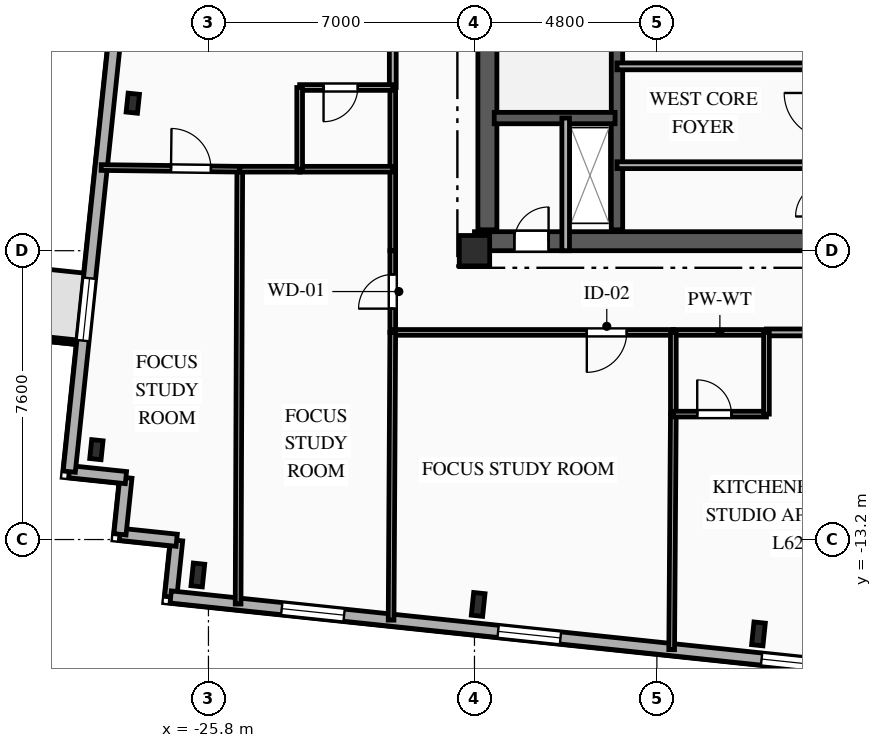
"""IFC4 building model, lengths in metres.
Left out: names, types, materials, properties, quantities, classifications, styles, units other than length and angle.
Written with IfcOpenShell. Run it as: python <this file> out.ifc"""

import sys

from ifc_helpers import new_model, si_unit, direction, frame, frame_2d, origin, origin_2d, place, context, subcontext, project, spatial, rectangle, i_section, extrude, element, fill, save


model = new_model("IFC4")
c1 = context("Model", 3, precision=1e-05, world=origin(), true_north=direction((0.0, 1.0)))
c2 = subcontext(c1, "Body", "Model", "MODEL_VIEW")
j1 = project(units=[si_unit("LENGTHUNIT", "METRE"), si_unit("PLANEANGLEUNIT", "RADIAN")], contexts=[c1])
p1 = place(None, origin())
s1 = spatial("IfcSite", under=j1, at=p1, CompositionType="ELEMENT")
p2 = place(p1, origin())
s2 = spatial("IfcBuilding", under=s1, at=p2, CompositionType="ELEMENT")
p3 = place(p2, frame((0.0, 0.0, 219.85)))
s3 = spatial("IfcBuildingStorey", under=s2, at=p3, CompositionType="ELEMENT", Elevation=219.85)
p4 = place(p3, frame((-18.8, -5.6, 0.0), z_axis=(0.0, 0.0, 1.0), x_axis=(1.0, 0.0, 0.0)))
e1 = element("IfcColumn", 1, at=p4, inside=s3, PredefinedType="COLUMN", context=c2, shape_type="SweptSolid", body=[
    extrude(rectangle(XDim=0.8, YDim=0.8, at=origin_2d()), origin(), (0.0, 0.0, 1.0), 3.35),
])
for number, where, z_axis, x_axis in (
    (2, (-26.079, -14.133, 0.0), (0.0, 0.0, 1.0), (0.995, -0.105, 0.0)),
    (3, (-18.703, -14.908, 0.0), (0.0, 0.0, 1.0), (0.995, -0.105, 0.0)),
    (4, (-11.327, -15.683, 0.0), (0.0, 0.0, 1.0), (0.995, -0.105, 0.0)),
):
    element("IfcColumn", number, at=place(p3, frame(where, z_axis=z_axis, x_axis=x_axis)), inside=s3, PredefinedType="COLUMN", context=c2, shape_type="SweptSolid", body=[
        extrude(i_section(OverallWidth=0.3, OverallDepth=0.6, WebThickness=0.015, FlangeThickness=0.03, FilletRadius=0.027, at=origin_2d()), origin(), (0.0, 0.0, 1.0), 3.35),
    ])
for number, where, z_axis, x_axis in (
    (5, (-27.791, -1.719, 0.0), (0.0, 0.0, 1.0), (0.995, -0.105, 0.0)),
    (6, (-28.749, -10.835, 0.0), (0.0, 0.0, 1.0), (0.995, -0.105, 0.0)),
):
    element("IfcColumn", number, at=place(p3, frame(where, z_axis=z_axis, x_axis=x_axis)), inside=s3, PredefinedType="COLUMN", context=c2, shape_type="SweptSolid", body=[
        extrude(i_section(OverallWidth=0.3, OverallDepth=0.5, WebThickness=0.014, FlangeThickness=0.028, FilletRadius=0.027, at=origin_2d()), origin(), (0.0, 0.0, 1.0), 3.35),
    ])
for number, where, z_axis, x_axis in (
    (7, (-26.793, -14.711, 0.0), (0.0, 0.0, 1.0), (0.104, 0.995, 0.0)),
    (8, (-26.637, -13.219, 0.0), (0.0, 0.0, 1.0), (-0.995, 0.104, 0.0)),
):
    element("IfcWall", number, at=place(p3, frame(where, z_axis=z_axis, x_axis=x_axis)), inside=s3, PredefinedType="SOLIDWALL", context=c2, shape_type="SweptSolid", body=[
        extrude(rectangle(XDim=1.5, YDim=0.32, at=frame_2d((0.75, 0.0))), origin(), (0.0, 0.0, 1.0), 3.0),
    ])
p5 = place(p3, frame((-28.128, -13.062, 0.0), z_axis=(0.0, 0.0, 1.0), x_axis=(0.104481464157, 0.994526834051, 0.0)))
e9 = element("IfcWall", 9, at=p5, inside=s3, PredefinedType="SOLIDWALL", context=c2, shape_type="SweptSolid", body=[
    extrude(rectangle(XDim=1.5, YDim=0.32, at=frame_2d((0.75, 0.0))), origin(), (0.0, 0.0, 1.0), 3.0),
])
p6 = place(p3, frame((-27.972, -11.571, 0.0), z_axis=(0.0, 0.0, 1.0), x_axis=(-0.994525057048, 0.104498377516, 0.0)))
e10 = element("IfcWall", 10, at=p6, inside=s3, PredefinedType="SOLIDWALL", context=c2, shape_type="SweptSolid", body=[
    extrude(rectangle(XDim=1.5, YDim=0.32, at=frame_2d((0.75, 0.0))), origin(), (0.0, 0.0, 1.0), 3.0),
])
p7 = place(p3, frame((-29.463, -11.414, 0.0), z_axis=(0.0, 0.0, 1.0), x_axis=(0.104530779244, 0.994521651947, 0.0)))
e11 = element("IfcWall", 11, at=p7, inside=s3, PredefinedType="SOLIDWALL", context=c2, shape_type="SweptSolid", body=[
    extrude(rectangle(XDim=28.8, YDim=0.32, at=frame_2d((14.4, 0.0))), origin(), (0.0, 0.0, 1.0), 3.0),
])
p8 = place(p7, frame((3.467, 0.0, 0.85)))
e12 = element("IfcOpeningElement", 12, at=p8, cuts=e11, PredefinedType="OPENING", context=c2, shape_type="SweptSolid", body=[
    extrude(rectangle(XDim=1.65, YDim=1.85, at=frame_2d((0.825, 0.925))), frame((0.0, 0.17, 0.0), z_axis=(0.0, -1.0, 0.0), x_axis=(1.0, 0.0, 0.0)), (0.0, 0.0, 1.0), 0.34),
])
p9 = place(p7, frame((12.738, 0.0, 0.85)))
e13 = element("IfcOpeningElement", 13, at=p9, cuts=e11, PredefinedType="OPENING", context=c2, shape_type="SweptSolid", body=[
    extrude(rectangle(XDim=2.2, YDim=1.85, at=frame_2d((1.1, 0.925))), frame((0.0, 0.17, 0.0), z_axis=(0.0, -1.0, 0.0), x_axis=(1.0, 0.0, 0.0)), (0.0, 0.0, 1.0), 0.34),
])
p10 = place(p7, frame((23.162, 0.0, 0.85)))
e14 = element("IfcOpeningElement", 14, at=p10, cuts=e11, PredefinedType="OPENING", context=c2, shape_type="SweptSolid", body=[
    extrude(rectangle(XDim=1.65, YDim=1.85, at=frame_2d((0.825, 0.925))), frame((0.0, 0.17, 0.0), z_axis=(0.0, -1.0, 0.0), x_axis=(1.0, 0.0, 0.0)), (0.0, 0.0, 1.0), 0.34),
])
p11 = place(p3, frame((18.756, -19.498, 0.0), z_axis=(0.0, 0.0, 1.0), x_axis=(-0.994522060044, 0.104526896475, 0.0)))
e15 = element("IfcWall", 15, at=p11, inside=s3, PredefinedType="SOLIDWALL", context=c2, shape_type="SweptSolid", body=[
    extrude(rectangle(XDim=45.8, YDim=0.32, at=frame_2d((22.9, 0.0))), origin(), (0.0, 0.0, 1.0), 3.0),
])
p12 = place(p11, frame((1.657, 0.0, 0.85)))
e16 = element("IfcOpeningElement", 16, at=p12, cuts=e15, PredefinedType="OPENING", context=c2, shape_type="SweptSolid", body=[
    extrude(rectangle(XDim=1.65, YDim=1.85, at=frame_2d((0.825, 0.925))), frame((0.0, 0.17, 0.0), z_axis=(0.0, -1.0, 0.0), x_axis=(1.0, 0.0, 0.0)), (0.0, 0.0, 1.0), 0.34),
])
p13 = place(p11, frame((6.907, 0.0, 0.85)))
e17 = element("IfcOpeningElement", 17, at=p13, cuts=e15, PredefinedType="OPENING", context=c2, shape_type="SweptSolid", body=[
    extrude(rectangle(XDim=2.2, YDim=1.85, at=frame_2d((1.1, 0.925))), frame((0.0, 0.17, 0.0), z_axis=(0.0, -1.0, 0.0), x_axis=(1.0, 0.0, 0.0)), (0.0, 0.0, 1.0), 0.34),
])
p14 = place(p11, frame((13.953, 0.0, 0.85)))
e18 = element("IfcOpeningElement", 18, at=p14, cuts=e15, PredefinedType="OPENING", context=c2, shape_type="SweptSolid", body=[
    extrude(rectangle(XDim=2.2, YDim=1.85, at=frame_2d((1.1, 0.925))), frame((0.0, 0.17, 0.0), z_axis=(0.0, -1.0, 0.0), x_axis=(1.0, 0.0, 0.0)), (0.0, 0.0, 1.0), 0.34),
])
p15 = place(p11, frame((20.959, 0.0, 0.85)))
e19 = element("IfcOpeningElement", 19, at=p15, cuts=e15, PredefinedType="OPENING", context=c2, shape_type="SweptSolid", body=[
    extrude(rectangle(XDim=2.2, YDim=1.85, at=frame_2d((1.1, 0.925))), frame((0.0, 0.17, 0.0), z_axis=(0.0, -1.0, 0.0), x_axis=(1.0, 0.0, 0.0)), (0.0, 0.0, 1.0), 0.34),
])
p16 = place(p11, frame((27.965, 0.0, 0.85)))
e20 = element("IfcOpeningElement", 20, at=p16, cuts=e15, PredefinedType="OPENING", context=c2, shape_type="SweptSolid", body=[
    extrude(rectangle(XDim=2.2, YDim=1.85, at=frame_2d((1.1, 0.925))), frame((0.0, 0.17, 0.0), z_axis=(0.0, -1.0, 0.0), x_axis=(1.0, 0.0, 0.0)), (0.0, 0.0, 1.0), 0.34),
])
p17 = place(p11, frame((35.487, 0.0, 0.85)))
e21 = element("IfcOpeningElement", 21, at=p17, cuts=e15, PredefinedType="OPENING", context=c2, shape_type="SweptSolid", body=[
    extrude(rectangle(XDim=1.65, YDim=1.85, at=frame_2d((0.825, 0.925))), frame((0.0, 0.17, 0.0), z_axis=(0.0, -1.0, 0.0), x_axis=(1.0, 0.0, 0.0)), (0.0, 0.0, 1.0), 0.34),
])
p18 = place(p11, frame((41.212, 0.0, 0.85)))
e22 = element("IfcOpeningElement", 22, at=p18, cuts=e15, PredefinedType="OPENING", context=c2, shape_type="SweptSolid", body=[
    extrude(rectangle(XDim=1.65, YDim=1.85, at=frame_2d((0.825, 0.925))), frame((0.0, 0.17, 0.0), z_axis=(0.0, -1.0, 0.0), x_axis=(1.0, 0.0, 0.0)), (0.0, 0.0, 1.0), 0.34),
])
p19 = place(p3, frame((-18.8, -5.35, 0.0), z_axis=(0.0, 0.0, 1.0), x_axis=(1.0, 0.0, 0.0)))
e23 = element("IfcWall", 23, at=p19, inside=s3, PredefinedType="SHEAR", context=c2, shape_type="SweptSolid", body=[
    extrude(rectangle(XDim=9.6, YDim=0.5, at=frame_2d((4.8, 0.0))), origin(), (0.0, 0.0, 1.0), 3.0),
])
p20 = place(p19, frame((1.05, 0.0, 0.0)))
e24 = element("IfcOpeningElement", 24, at=p20, cuts=e23, PredefinedType="OPENING", context=c2, shape_type="SweptSolid", body=[
    extrude(rectangle(XDim=0.9, YDim=2.1, at=frame_2d((0.45, 1.05))), frame((0.0, 0.26, 0.0), z_axis=(0.0, -1.0, 0.0), x_axis=(1.0, 0.0, 0.0)), (0.0, 0.0, 1.0), 0.52),
])
p21 = place(p3, frame((-18.46, -5.05, 0.0), z_axis=(0.0, 0.0, 1.0), x_axis=(0.0, 1.0, 0.0)))
e25 = element("IfcWall", 25, at=p21, inside=s3, PredefinedType="SHEAR", context=c2, shape_type="SweptSolid", body=[
    extrude(rectangle(XDim=10.1, YDim=0.5, at=frame_2d((5.05, 0.0))), origin(), (0.0, 0.0, 1.0), 3.0),
])
p22 = place(p3, frame((-15.05, -5.05, 0.0), z_axis=(0.0, 0.0, 1.0), x_axis=(0.0, 1.0, 0.0)))
e26 = element("IfcWall", 26, at=p22, inside=s3, PredefinedType="SHEAR", context=c2, shape_type="SweptSolid", body=[
    extrude(rectangle(XDim=10.1, YDim=0.3, at=frame_2d((5.05, 0.0))), origin(), (0.0, 0.0, 1.0), 3.0),
])
p23 = place(p3, frame((-18.28, -2.11, 0.0), z_axis=(0.0, 0.0, 1.0), x_axis=(1.0, 0.0, 0.0)))
e27 = element("IfcWall", 27, at=p23, inside=s3, PredefinedType="SHEAR", context=c2, shape_type="SweptSolid", body=[
    extrude(rectangle(XDim=3.18, YDim=0.3, at=frame_2d((1.59, 0.0))), origin(), (0.0, 0.0, 1.0), 3.0),
])
p24 = place(p3, frame((-16.4, -5.6, 0.0), z_axis=(0.0, 0.0, 1.0), x_axis=(0.0, 1.0, 0.0)))
e28 = element("IfcWall", 28, at=p24, inside=s3, PredefinedType="PARTITIONING", context=c2, shape_type="SweptSolid", body=[
    extrude(rectangle(XDim=3.49, YDim=0.2, at=frame_2d((1.745, 0.0))), origin(), (0.0, 0.0, 1.0), 3.0),
])
p25 = place(p3, frame((-15.05, -3.35, 0.0), z_axis=(0.0, 0.0, 1.0), x_axis=(1.0, 0.0, 0.0)))
e29 = element("IfcWall", 29, at=p25, inside=s3, PredefinedType="PARTITIONING", context=c2, shape_type="SweptSolid", body=[
    extrude(rectangle(XDim=5.85, YDim=0.18, at=frame_2d((2.925, 0.0))), origin(), (0.0, 0.0, 1.0), 2.715),
])
p26 = place(p3, frame((-9.2, -0.75, 0.0), z_axis=(0.0, 0.0, 1.0), x_axis=(-1.0, 0.0, 0.0)))
e30 = element("IfcWall", 30, at=p26, inside=s3, PredefinedType="PARTITIONING", context=c2, shape_type="SweptSolid", body=[
    extrude(rectangle(XDim=5.85, YDim=0.18, at=frame_2d((2.925, 0.0))), origin(), (0.0, 0.0, 1.0), 3.0),
])
p27 = place(p3, frame((-20.95, -7.75, 0.0), z_axis=(0.0, 0.0, 1.0), x_axis=(0.0, 1.0, 0.0)))
e31 = element("IfcWall", 31, at=p27, inside=s3, PredefinedType="PARTITIONING", context=c2, shape_type="SweptSolid", body=[
    extrude(rectangle(XDim=2.15, YDim=0.15, at=frame_2d((1.075, 0.0))), origin(), (0.0, 0.0, 1.0), 3.0),
])
p28 = place(p27, frame((0.625, 0.0, 0.0)))
e32 = element("IfcOpeningElement", 32, at=p28, cuts=e31, PredefinedType="OPENING", context=c2, shape_type="SweptSolid", body=[
    extrude(rectangle(XDim=0.9, YDim=2.1, at=frame_2d((0.45, 1.05))), frame((0.0, 0.085, 0.0), z_axis=(0.0, -1.0, 0.0), x_axis=(1.0, 0.0, 0.0)), (0.0, 0.0, 1.0), 0.17),
])
p29 = place(p3, frame((-13.567, -7.75, 0.0), z_axis=(0.0, 0.0, 1.0), x_axis=(-1.0, 0.0, 0.0)))
e33 = element("IfcWall", 33, at=p29, inside=s3, PredefinedType="PARTITIONING", context=c2, shape_type="SweptSolid", body=[
    extrude(rectangle(XDim=7.383, YDim=0.15, at=frame_2d((3.691, 0.0))), origin(), (0.0, 0.0, 1.0), 3.0),
])
p30 = place(p29, frame((1.227, 0.0, 0.0)))
e34 = element("IfcOpeningElement", 34, at=p30, cuts=e33, PredefinedType="OPENING", context=c2, shape_type="SweptSolid", body=[
    extrude(rectangle(XDim=1.05, YDim=2.15, at=frame_2d((0.525, 1.075))), frame((0.0, 0.085, 0.0), z_axis=(0.0, -1.0, 0.0), x_axis=(1.0, 0.0, 0.0)), (0.0, 0.0, 1.0), 0.17),
])
p31 = place(p3, frame((-6.583, -7.75, 0.0), z_axis=(0.0, 0.0, 1.0), x_axis=(-1.0, 0.0, 0.0)))
e35 = element("IfcWall", 35, at=p31, inside=s3, PredefinedType="PARTITIONING", context=c2, shape_type="SweptSolid", body=[
    extrude(rectangle(XDim=4.534, YDim=0.18, at=frame_2d((2.267, 0.0))), origin(), (0.0, 0.0, 1.0), 3.0),
])
p32 = place(p31, frame((0.877, 0.0, 0.0)))
e36 = element("IfcOpeningElement", 36, at=p32, cuts=e35, PredefinedType="OPENING", context=c2, shape_type="SweptSolid", body=[
    extrude(rectangle(XDim=1.0, YDim=2.15, at=frame_2d((0.5, 1.075))), frame((0.0, 0.1, 0.0), z_axis=(0.0, -1.0, 0.0), x_axis=(1.0, 0.0, 0.0)), (0.0, 0.0, 1.0), 0.2),
])
p33 = place(p3, frame((-11.117, -7.75, 0.0), z_axis=(0.0, 0.0, 1.0), x_axis=(-1.0, 0.0, 0.0)))
e37 = element("IfcWall", 37, at=p33, inside=s3, PredefinedType="PLUMBINGWALL", context=c2, shape_type="SweptSolid", body=[
    extrude(rectangle(XDim=2.45, YDim=0.15, at=frame_2d((1.225, 0.0))), origin(), (0.0, 0.0, 1.0), 3.0),
])
p34 = place(p3, frame((-20.95, -5.6, 0.0), z_axis=(0.0, 0.0, 1.0), x_axis=(0.0, 1.0, 0.0)))
e38 = element("IfcWall", 38, at=p34, inside=s3, PredefinedType="PARTITIONING", context=c2, shape_type="SweptSolid", body=[
    extrude(rectangle(XDim=2.144, YDim=0.15, at=frame_2d((1.072, 0.0))), origin(), (0.0, 0.0, 1.0), 3.0),
])
p35 = place(p3, frame((-20.95, -1.306, 0.0), z_axis=(0.0, 0.0, 1.0), x_axis=(0.0, 1.0, 0.0)))
e39 = element("IfcWall", 39, at=p35, inside=s3, PredefinedType="PARTITIONING", context=c2, shape_type="SweptSolid", body=[
    extrude(rectangle(XDim=9.296, YDim=0.18, at=frame_2d((4.648, 0.0))), origin(), (0.0, 0.0, 1.0), 3.0),
])
p36 = place(p35, frame((1.472, 0.0, 0.0)))
e40 = element("IfcOpeningElement", 40, at=p36, cuts=e39, PredefinedType="OPENING", context=c2, shape_type="SweptSolid", body=[
    extrude(rectangle(XDim=1.0, YDim=2.15, at=frame_2d((0.5, 1.075))), frame((0.0, 0.1, 0.0), z_axis=(0.0, -1.0, 0.0), x_axis=(1.0, 0.0, 0.0)), (0.0, 0.0, 1.0), 0.2),
])
p37 = place(p3, frame((-20.95, -3.456, 0.0), z_axis=(0.0, 0.0, 1.0), x_axis=(0.0, 1.0, 0.0)))
e41 = element("IfcWall", 41, at=p37, inside=s3, PredefinedType="PLUMBINGWALL", context=c2, shape_type="SweptSolid", body=[
    extrude(rectangle(XDim=2.15, YDim=0.15, at=frame_2d((1.075, 0.0))), origin(), (0.0, 0.0, 1.0), 3.0),
])
p38 = place(p3, frame((-24.976, -3.456, 0.0), z_axis=(0.0, 0.0, 1.0), x_axis=(-0.003840873, -0.99999262382, 0.0)))
e42 = element("IfcWall", 42, at=p38, inside=s3, PredefinedType="PARTITIONING", context=c2, shape_type="SweptSolid", body=[
    extrude(rectangle(XDim=11.441, YDim=0.15, at=frame_2d((5.721, 0.0))), origin(), (0.0, 0.0, 1.0), 3.0),
])
p39 = place(p3, frame((-28.622, -3.412, 0.0), z_axis=(0.0, 0.0, 1.0), x_axis=(0.999927389555, -0.01205054433, 0.0)))
e43 = element("IfcWall", 43, at=p39, inside=s3, PredefinedType="PARTITIONING", context=c2, shape_type="SweptSolid", body=[
    extrude(rectangle(XDim=3.647, YDim=0.15, at=frame_2d((1.823, 0.0))), origin(), (0.0, 0.0, 1.0), 3.0),
])
p40 = place(p39, frame((1.837, 0.0, 0.0)))
e44 = element("IfcOpeningElement", 44, at=p40, cuts=e43, PredefinedType="OPENING", context=c2, shape_type="SweptSolid", body=[
    extrude(rectangle(XDim=1.05, YDim=2.15, at=frame_2d((0.525, 1.075))), frame((0.0, 0.085, 0.0), z_axis=(0.0, -1.0, 0.0), x_axis=(1.0, 0.0, 0.0)), (0.0, 0.0, 1.0), 0.17),
])
p41 = place(p3, frame((-24.976, -3.456, 0.0), z_axis=(0.0, 0.0, 1.0), x_axis=(1.0, 0.0, 0.0)))
e45 = element("IfcWall", 45, at=p41, inside=s3, PredefinedType="PARTITIONING", context=c2, shape_type="SweptSolid", body=[
    extrude(rectangle(XDim=1.576, YDim=0.15, at=frame_2d((0.788, 0.0))), origin(), (0.0, 0.0, 1.0), 3.0),
])
p42 = place(p3, frame((-23.4, -3.456, 0.0), z_axis=(0.0, 0.0, 1.0), x_axis=(1.0, 0.0, 0.0)))
e46 = element("IfcWall", 46, at=p42, inside=s3, PredefinedType="PLUMBINGWALL", context=c2, shape_type="SweptSolid", body=[
    extrude(rectangle(XDim=2.45, YDim=0.15, at=frame_2d((1.225, 0.0))), origin(), (0.0, 0.0, 1.0), 3.0),
])
p43 = place(p3, frame((-20.95, -7.75, 0.0), z_axis=(0.0, 0.0, 1.0), x_axis=(-0.005804668564, -0.99998315277, 0.0)))
e47 = element("IfcWall", 47, at=p43, inside=s3, PredefinedType="PARTITIONING", context=c2, shape_type="SweptSolid", body=[
    extrude(rectangle(XDim=7.571, YDim=0.15, at=frame_2d((3.785, 0.0))), origin(), (0.0, 0.0, 1.0), 3.0),
])
p44 = place(p3, frame((-20.95, -1.306, 0.0), z_axis=(0.0, 0.0, 1.0), x_axis=(-1.0, 0.0, 0.0)))
e48 = element("IfcWall", 48, at=p44, inside=s3, PredefinedType="PLUMBINGWALL", context=c2, shape_type="SweptSolid", body=[
    extrude(rectangle(XDim=2.45, YDim=0.15, at=frame_2d((1.225, 0.0))), origin(), (0.0, 0.0, 1.0), 3.0),
])
p45 = place(p44, frame((0.921, 0.0, 0.0)))
e49 = element("IfcOpeningElement", 49, at=p45, cuts=e48, PredefinedType="OPENING", context=c2, shape_type="SweptSolid", body=[
    extrude(rectangle(XDim=0.9, YDim=2.1, at=frame_2d((0.45, 1.05))), frame((0.0, 0.085, 0.0), z_axis=(0.0, -1.0, 0.0), x_axis=(1.0, 0.0, 0.0)), (0.0, 0.0, 1.0), 0.17),
])
p46 = place(p3, frame((-23.4, -1.306, 0.0), z_axis=(0.0, 0.0, 1.0), x_axis=(0.0, -1.0, 0.0)))
e50 = element("IfcWall", 50, at=p46, inside=s3, PredefinedType="PLUMBINGWALL", context=c2, shape_type="SweptSolid", body=[
    extrude(rectangle(XDim=2.15, YDim=0.15, at=frame_2d((1.075, 0.0))), origin(), (0.0, 0.0, 1.0), 2.655),
])
p47 = place(p3, frame((-13.567, -9.9, 0.0), z_axis=(0.0, 0.0, 1.0), x_axis=(-0.007091740814, -0.99997485329, 0.0)))
e51 = element("IfcWall", 51, at=p47, inside=s3, PredefinedType="PARTITIONING", context=c2, shape_type="SweptSolid", body=[
    extrude(rectangle(XDim=6.197, YDim=0.15, at=frame_2d((3.098, 0.0))), origin(), (0.0, 0.0, 1.0), 3.0),
])
p48 = place(p3, frame((-13.567, -7.75, 0.0), z_axis=(0.0, 0.0, 1.0), x_axis=(0.0, -1.0, 0.0)))
e52 = element("IfcWall", 52, at=p48, inside=s3, PredefinedType="PLUMBINGWALL", context=c2, shape_type="SweptSolid", body=[
    extrude(rectangle(XDim=2.15, YDim=0.15, at=frame_2d((1.075, 0.0))), origin(), (0.0, 0.0, 1.0), 3.0),
])
p49 = place(p3, frame((-13.567, -9.9, 0.0), z_axis=(0.0, 0.0, 1.0), x_axis=(1.0, 0.0, 0.0)))
e53 = element("IfcWall", 53, at=p49, inside=s3, PredefinedType="PLUMBINGWALL", context=c2, shape_type="SweptSolid", body=[
    extrude(rectangle(XDim=2.45, YDim=0.15, at=frame_2d((1.225, 0.0))), origin(), (0.0, 0.0, 1.0), 3.0),
])
p50 = place(p49, frame((0.629, 0.0, 0.0)))
e54 = element("IfcOpeningElement", 54, at=p50, cuts=e53, PredefinedType="OPENING", context=c2, shape_type="SweptSolid", body=[
    extrude(rectangle(XDim=0.9, YDim=2.1, at=frame_2d((0.45, 1.05))), frame((0.0, 0.085, 0.0), z_axis=(0.0, -1.0, 0.0), x_axis=(1.0, 0.0, 0.0)), (0.0, 0.0, 1.0), 0.17),
])
p51 = place(p3, frame((-11.117, -9.9, 0.0), z_axis=(0.0, 0.0, 1.0), x_axis=(0.0, 1.0, 0.0)))
e55 = element("IfcWall", 55, at=p51, inside=s3, PredefinedType="PLUMBINGWALL", context=c2, shape_type="SweptSolid", body=[
    extrude(rectangle(XDim=2.15, YDim=0.15, at=frame_2d((1.075, 0.0))), origin(), (0.0, 0.0, 1.0), 3.0),
])
p52 = place(p8, origin())
e56 = element("IfcWindow", 56, at=p52, inside=s3, PartitioningType="SINGLE_PANEL", PredefinedType="WINDOW", context=c2, shape_type="SweptSolid", body=[
    extrude(rectangle(XDim=1.65, YDim=1.85, at=frame_2d((0.825, 0.925))), frame((0.0, 0.03, 0.0), z_axis=(0.0, -1.0, 0.0), x_axis=(1.0, 0.0, 0.0)), (0.0, 0.0, 1.0), 0.06),
])
fill(e12, e56)
p53 = place(p16, origin())
e57 = element("IfcWindow", 57, at=p53, inside=s3, PartitioningType="SINGLE_PANEL", PredefinedType="WINDOW", context=c2, shape_type="SweptSolid", body=[
    extrude(rectangle(XDim=2.2, YDim=1.85, at=frame_2d((1.1, 0.925))), frame((0.0, 0.03, 0.0), z_axis=(0.0, -1.0, 0.0), x_axis=(1.0, 0.0, 0.0)), (0.0, 0.0, 1.0), 0.06),
])
fill(e20, e57)
p54 = place(p17, origin())
e58 = element("IfcWindow", 58, at=p54, inside=s3, PartitioningType="SINGLE_PANEL", PredefinedType="WINDOW", context=c2, shape_type="SweptSolid", body=[
    extrude(rectangle(XDim=1.65, YDim=1.85, at=frame_2d((0.825, 0.925))), frame((0.0, 0.03, 0.0), z_axis=(0.0, -1.0, 0.0), x_axis=(1.0, 0.0, 0.0)), (0.0, 0.0, 1.0), 0.06),
])
fill(e21, e58)
p55 = place(p18, origin())
e59 = element("IfcWindow", 59, at=p55, inside=s3, PartitioningType="SINGLE_PANEL", PredefinedType="WINDOW", context=c2, shape_type="SweptSolid", body=[
    extrude(rectangle(XDim=1.65, YDim=1.85, at=frame_2d((0.825, 0.925))), frame((0.0, 0.03, 0.0), z_axis=(0.0, -1.0, 0.0), x_axis=(1.0, 0.0, 0.0)), (0.0, 0.0, 1.0), 0.06),
])
fill(e22, e59)
p56 = place(p20, origin())
e60 = element("IfcDoor", 60, at=p56, inside=s3, OperationType="SINGLE_SWING_RIGHT", PredefinedType="DOOR", context=c2, shape_type="SweptSolid", body=[
    extrude(rectangle(XDim=0.9, YDim=2.1, at=frame_2d((0.45, 1.05))), frame((0.0, 0.025, 0.0), z_axis=(0.0, -1.0, 0.0), x_axis=(1.0, 0.0, 0.0)), (0.0, 0.0, 1.0), 0.05),
])
fill(e24, e60)
p57 = place(p28, origin())
e61 = element("IfcDoor", 61, at=p57, inside=s3, OperationType="SINGLE_SWING_LEFT", PredefinedType="DOOR", context=c2, shape_type="SweptSolid", body=[
    extrude(rectangle(XDim=0.9, YDim=2.1, at=frame_2d((0.45, 1.05))), frame((0.0, 0.025, 0.0), z_axis=(0.0, -1.0, 0.0), x_axis=(1.0, 0.0, 0.0)), (0.0, 0.0, 1.0), 0.05),
])
fill(e32, e61)
p58 = place(p30, origin())
e62 = element("IfcDoor", 62, at=p58, inside=s3, OperationType="SINGLE_SWING_RIGHT", PredefinedType="DOOR", context=c2, shape_type="SweptSolid", body=[
    extrude(rectangle(XDim=1.05, YDim=2.15, at=frame_2d((0.525, 1.075))), frame((0.0, 0.025, 0.0), z_axis=(0.0, -1.0, 0.0), x_axis=(1.0, 0.0, 0.0)), (0.0, 0.0, 1.0), 0.05),
])
fill(e34, e62)
p59 = place(p40, origin())
e63 = element("IfcDoor", 63, at=p59, inside=s3, OperationType="SINGLE_SWING_LEFT", PredefinedType="DOOR", context=c2, shape_type="SweptSolid", body=[
    extrude(rectangle(XDim=1.05, YDim=2.15, at=frame_2d((0.525, 1.075))), frame((0.0, 0.025, 0.0), z_axis=(0.0, -1.0, 0.0), x_axis=(1.0, 0.0, 0.0)), (0.0, 0.0, 1.0), 0.05),
])
fill(e44, e63)
p60 = place(p45, origin())
e64 = element("IfcDoor", 64, at=p60, inside=s3, OperationType="SINGLE_SWING_RIGHT", PredefinedType="DOOR", context=c2, shape_type="SweptSolid", body=[
    extrude(rectangle(XDim=0.9, YDim=2.1, at=frame_2d((0.45, 1.05))), frame((0.0, 0.025, 0.0), z_axis=(0.0, -1.0, 0.0), x_axis=(1.0, 0.0, 0.0)), (0.0, 0.0, 1.0), 0.05),
])
fill(e49, e64)
p61 = place(p50, origin())
e65 = element("IfcDoor", 65, at=p61, inside=s3, OperationType="SINGLE_SWING_LEFT", PredefinedType="DOOR", context=c2, shape_type="SweptSolid", body=[
    extrude(rectangle(XDim=0.9, YDim=2.1, at=frame_2d((0.45, 1.05))), frame((0.0, 0.025, 0.0), z_axis=(0.0, -1.0, 0.0), x_axis=(1.0, 0.0, 0.0)), (0.0, 0.0, 1.0), 0.05),
])
fill(e54, e65)
save(model, sys.argv[1])
